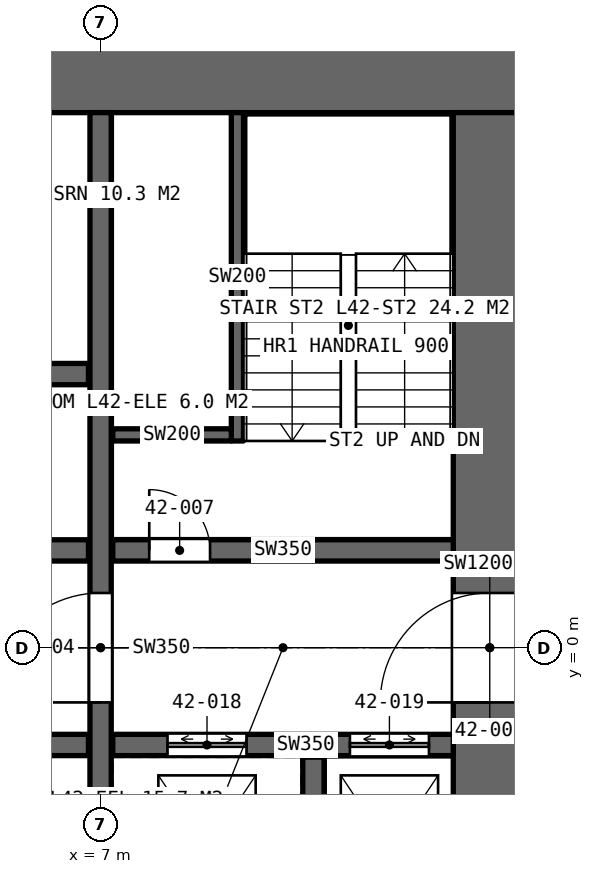
"""IFC4 building model, lengths in metres.
Left out: names, types, materials, properties, quantities, classifications, styles, units other than length and angle.
Written with IfcOpenShell. Run it as: python <this file> out.ifc"""

import sys

from ifc_helpers import new_model, si_unit, direction, frame, frame_2d, origin, place, context, subcontext, project, spatial, rectangle, extrude, element, fill, save


model = new_model("IFC4")
c1 = context("Model", 3, precision=1e-05, world=origin(), true_north=direction((0.0, 1.0)))
c2 = subcontext(c1, "Body", "Model", "MODEL_VIEW")
j1 = project(units=[si_unit("LENGTHUNIT", "METRE"), si_unit("PLANEANGLEUNIT", "RADIAN")], contexts=[c1])
p1 = place(None, origin())
s1 = spatial("IfcSite", under=j1, at=p1, CompositionType="ELEMENT")
p2 = place(p1, origin())
s2 = spatial("IfcBuilding", under=s1, at=p2, CompositionType="ELEMENT")
p3 = place(p2, frame((0.0, 0.0, 194.8)))
s3 = spatial("IfcBuildingStorey", under=s2, at=p3, CompositionType="ELEMENT", Elevation=194.8)
p4 = place(p3, frame((14.0, 9.4, 0.0), z_axis=(0.0, 0.0, 1.0), x_axis=(-1.0, 0.0, 0.0)))
e1 = element("IfcWall", 1, at=p4, inside=s3, PredefinedType="SHEAR", context=c2, shape_type="SweptSolid", body=[
    extrude(rectangle(XDim=28.0, YDim=1.2, at=frame_2d((14.0, 0.0))), origin(), (0.0, 0.0, 1.0), 4.2),
])
p5 = place(p4, frame((24.0, 0.0, 0.0)))
e2 = element("IfcOpeningElement", 2, at=p5, cuts=e1, PredefinedType="OPENING", context=c2, shape_type="SweptSolid", body=[
    extrude(rectangle(XDim=1.0, YDim=2.4, at=frame_2d((0.5, 1.2))), frame((0.0, 0.61, 0.0), z_axis=(0.0, -1.0, 0.0), x_axis=(1.0, 0.0, 0.0)), (0.0, 0.0, 1.0), 1.22),
])
p6 = place(p3, frame((13.4, -8.8, 0.0), z_axis=(0.0, 0.0, 1.0), x_axis=(0.0, 1.0, 0.0)))
e3 = element("IfcWall", 3, at=p6, inside=s3, PredefinedType="SHEAR", context=c2, shape_type="SweptSolid", body=[
    extrude(rectangle(XDim=17.6, YDim=1.2, at=frame_2d((8.8, 0.0))), origin(), (0.0, 0.0, 1.0), 4.2),
])
p7 = place(p6, frame((7.9, 0.0, 0.0)))
e4 = element("IfcOpeningElement", 4, at=p7, cuts=e3, PredefinedType="OPENING", context=c2, shape_type="SweptSolid", body=[
    extrude(rectangle(XDim=1.8, YDim=2.4, at=frame_2d((0.9, 1.2))), frame((0.0, 0.61, 0.0), z_axis=(0.0, -1.0, 0.0), x_axis=(1.0, 0.0, 0.0)), (0.0, 0.0, 1.0), 1.22),
])
p8 = place(p3, frame((7.0, -8.8, 0.0), z_axis=(0.0, 0.0, 1.0), x_axis=(0.0, 1.0, 0.0)))
e5 = element("IfcWall", 5, at=p8, inside=s3, PredefinedType="SHEAR", context=c2, shape_type="SweptSolid", body=[
    extrude(rectangle(XDim=17.6, YDim=0.35, at=frame_2d((8.8, 0.0))), origin(), (0.0, 0.0, 1.0), 4.2),
])
p9 = place(p8, frame((7.9, 0.0, 0.0)))
e6 = element("IfcOpeningElement", 6, at=p9, cuts=e5, PredefinedType="OPENING", context=c2, shape_type="SweptSolid", body=[
    extrude(rectangle(XDim=1.8, YDim=2.4, at=frame_2d((0.9, 1.2))), frame((0.0, 0.185, 0.0), z_axis=(0.0, -1.0, 0.0), x_axis=(1.0, 0.0, 0.0)), (0.0, 0.0, 1.0), 0.37),
])
p10 = place(p3, frame((-6.8, 1.6, 0.0), z_axis=(0.0, 0.0, 1.0), x_axis=(1.0, 0.0, 0.0)))
e7 = element("IfcWall", 7, at=p10, inside=s3, PredefinedType="SHEAR", context=c2, shape_type="SweptSolid", body=[
    extrude(rectangle(XDim=13.6, YDim=0.35, at=frame_2d((6.8, 0.0))), origin(), (0.0, 0.0, 1.0), 4.2),
])
p11 = place(p10, frame((11.9, 0.0, 0.0)))
e8 = element("IfcOpeningElement", 8, at=p11, cuts=e7, PredefinedType="OPENING", context=c2, shape_type="SweptSolid", body=[
    extrude(rectangle(XDim=1.0, YDim=2.4, at=frame_2d((0.5, 1.2))), frame((0.0, 0.185, 0.0), z_axis=(0.0, -1.0, 0.0), x_axis=(1.0, 0.0, 0.0)), (0.0, 0.0, 1.0), 0.37),
])
p12 = place(p10, frame((4.5, 0.0, 0.0)))
e9 = element("IfcOpeningElement", 9, at=p12, cuts=e7, PredefinedType="OPENING", context=c2, shape_type="SweptSolid", body=[
    extrude(rectangle(XDim=1.8, YDim=2.4, at=frame_2d((0.9, 1.2))), frame((0.0, 0.185, 0.0), z_axis=(0.0, -1.0, 0.0), x_axis=(1.0, 0.0, 0.0)), (0.0, 0.0, 1.0), 0.37),
])
p13 = place(p3, frame((-6.8, -1.6, 0.0), z_axis=(0.0, 0.0, 1.0), x_axis=(1.0, 0.0, 0.0)))
e10 = element("IfcWall", 10, at=p13, inside=s3, PredefinedType="SHEAR", context=c2, shape_type="SweptSolid", body=[
    extrude(rectangle(XDim=13.6, YDim=0.35, at=frame_2d((6.8, 0.0))), origin(), (0.0, 0.0, 1.0), 4.2),
])
p14 = place(p13, frame((1.265, 0.0, 0.0)))
e11 = element("IfcOpeningElement", 11, at=p14, cuts=e10, PredefinedType="OPENING", context=c2, shape_type="SweptSolid", body=[
    extrude(rectangle(XDim=1.0, YDim=2.4, at=frame_2d((0.5, 1.2))), frame((0.0, 0.185, 0.0), z_axis=(0.0, -1.0, 0.0), x_axis=(1.0, 0.0, 0.0)), (0.0, 0.0, 1.0), 0.37),
])
p15 = place(p13, frame((4.9, 0.0, 0.0)))
e12 = element("IfcOpeningElement", 12, at=p15, cuts=e10, PredefinedType="OPENING", context=c2, shape_type="SweptSolid", body=[
    extrude(rectangle(XDim=1.0, YDim=2.4, at=frame_2d((0.5, 1.2))), frame((0.0, 0.185, 0.0), z_axis=(0.0, -1.0, 0.0), x_axis=(1.0, 0.0, 0.0)), (0.0, 0.0, 1.0), 0.37),
])
p16 = place(p13, frame((8.485, 0.0, 0.0)))
e13 = element("IfcOpeningElement", 13, at=p16, cuts=e10, PredefinedType="OPENING", context=c2, shape_type="SweptSolid", body=[
    extrude(rectangle(XDim=1.1, YDim=2.4, at=frame_2d((0.55, 1.2))), frame((0.0, 0.185, 0.0), z_axis=(0.0, -1.0, 0.0), x_axis=(1.0, 0.0, 0.0)), (0.0, 0.0, 1.0), 0.37),
])
p17 = place(p13, frame((11.95, 0.0, 0.0)))
e14 = element("IfcOpeningElement", 14, at=p17, cuts=e10, PredefinedType="OPENING", context=c2, shape_type="SweptSolid", body=[
    extrude(rectangle(XDim=0.9, YDim=2.4, at=frame_2d((0.45, 1.2))), frame((0.0, 0.185, 0.0), z_axis=(0.0, -1.0, 0.0), x_axis=(1.0, 0.0, 0.0)), (0.0, 0.0, 1.0), 0.37),
])
p18 = place(p3, frame((-6.8, 4.5, 0.0), z_axis=(0.0, 0.0, 1.0), x_axis=(1.0, 0.0, 0.0)))
e15 = element("IfcWall", 15, at=p18, inside=s3, PredefinedType="SHEAR", context=c2, shape_type="SweptSolid", body=[
    extrude(rectangle(XDim=13.6, YDim=0.35, at=frame_2d((6.8, 0.0))), origin(), (0.0, 0.0, 1.0), 4.2),
])
p19 = place(p18, frame((0.7, 0.0, 0.0)))
e16 = element("IfcOpeningElement", 16, at=p19, cuts=e15, PredefinedType="OPENING", context=c2, shape_type="SweptSolid", body=[
    extrude(rectangle(XDim=1.1, YDim=2.4, at=frame_2d((0.55, 1.2))), frame((0.0, 0.185, 0.0), z_axis=(0.0, -1.0, 0.0), x_axis=(1.0, 0.0, 0.0)), (0.0, 0.0, 1.0), 0.37),
])
p20 = place(p18, frame((3.5, 0.0, 0.0)))
e17 = element("IfcOpeningElement", 17, at=p20, cuts=e15, PredefinedType="OPENING", context=c2, shape_type="SweptSolid", body=[
    extrude(rectangle(XDim=1.1, YDim=2.4, at=frame_2d((0.55, 1.2))), frame((0.0, 0.185, 0.0), z_axis=(0.0, -1.0, 0.0), x_axis=(1.0, 0.0, 0.0)), (0.0, 0.0, 1.0), 0.37),
])
p21 = place(p18, frame((6.3, 0.0, 0.0)))
e18 = element("IfcOpeningElement", 18, at=p21, cuts=e15, PredefinedType="OPENING", context=c2, shape_type="SweptSolid", body=[
    extrude(rectangle(XDim=1.1, YDim=2.4, at=frame_2d((0.55, 1.2))), frame((0.0, 0.185, 0.0), z_axis=(0.0, -1.0, 0.0), x_axis=(1.0, 0.0, 0.0)), (0.0, 0.0, 1.0), 0.37),
])
p22 = place(p18, frame((9.1, 0.0, 0.0)))
e19 = element("IfcOpeningElement", 19, at=p22, cuts=e15, PredefinedType="OPENING", context=c2, shape_type="SweptSolid", body=[
    extrude(rectangle(XDim=1.1, YDim=2.4, at=frame_2d((0.55, 1.2))), frame((0.0, 0.185, 0.0), z_axis=(0.0, -1.0, 0.0), x_axis=(1.0, 0.0, 0.0)), (0.0, 0.0, 1.0), 0.37),
])
p23 = place(p3, frame((7.2, 1.6, 0.0), z_axis=(0.0, 0.0, 1.0), x_axis=(1.0, 0.0, 0.0)))
e20 = element("IfcWall", 20, at=p23, inside=s3, PredefinedType="SHEAR", context=c2, shape_type="SweptSolid", body=[
    extrude(rectangle(XDim=5.6, YDim=0.35, at=frame_2d((2.8, 0.0))), origin(), (0.0, 0.0, 1.0), 4.2),
])
p24 = place(p23, frame((0.6, 0.0, 0.0)))
e21 = element("IfcOpeningElement", 21, at=p24, cuts=e20, PredefinedType="OPENING", context=c2, shape_type="SweptSolid", body=[
    extrude(rectangle(XDim=1.0, YDim=2.4, at=frame_2d((0.5, 1.2))), frame((0.0, 0.185, 0.0), z_axis=(0.0, -1.0, 0.0), x_axis=(1.0, 0.0, 0.0)), (0.0, 0.0, 1.0), 0.37),
])
p25 = place(p3, frame((7.2, -1.6, 0.0), z_axis=(0.0, 0.0, 1.0), x_axis=(1.0, 0.0, 0.0)))
e22 = element("IfcWall", 22, at=p25, inside=s3, PredefinedType="SHEAR", context=c2, shape_type="SweptSolid", body=[
    extrude(rectangle(XDim=5.6, YDim=0.35, at=frame_2d((2.8, 0.0))), origin(), (0.0, 0.0, 1.0), 4.2),
])
p26 = place(p25, frame((0.9, 0.0, 0.0)))
e23 = element("IfcOpeningElement", 23, at=p26, cuts=e22, PredefinedType="OPENING", context=c2, shape_type="SweptSolid", body=[
    extrude(rectangle(XDim=1.3, YDim=2.4, at=frame_2d((0.65, 1.2))), frame((0.0, 0.185, 0.0), z_axis=(0.0, -1.0, 0.0), x_axis=(1.0, 0.0, 0.0)), (0.0, 0.0, 1.0), 0.37),
])
p27 = place(p25, frame((3.9, 0.0, 0.0)))
e24 = element("IfcOpeningElement", 24, at=p27, cuts=e22, PredefinedType="OPENING", context=c2, shape_type="SweptSolid", body=[
    extrude(rectangle(XDim=1.3, YDim=2.4, at=frame_2d((0.65, 1.2))), frame((0.0, 0.185, 0.0), z_axis=(0.0, -1.0, 0.0), x_axis=(1.0, 0.0, 0.0)), (0.0, 0.0, 1.0), 0.37),
])
p28 = place(p3, frame((10.5, -4.8, 0.0), z_axis=(0.0, 0.0, 1.0), x_axis=(0.0, 1.0, 0.0)))
e25 = element("IfcWall", 25, at=p28, inside=s3, PredefinedType="SHEAR", context=c2, shape_type="SweptSolid", body=[
    extrude(rectangle(XDim=3.0, YDim=0.35, at=frame_2d((1.5, 0.0))), origin(), (0.0, 0.0, 1.0), 4.2),
])
p29 = place(p3, frame((9.25, 3.4, 0.0), z_axis=(0.0, 0.0, 1.0), x_axis=(0.0, 1.0, 0.0)))
e26 = element("IfcWall", 26, at=p29, inside=s3, PredefinedType="SOLIDWALL", context=c2, shape_type="SweptSolid", body=[
    extrude(rectangle(XDim=5.4, YDim=0.2, at=frame_2d((2.7, 0.0))), origin(), (0.0, 0.0, 1.0), 4.2),
])
p30 = place(p3, frame((9.15, 3.5, 0.0), z_axis=(0.0, 0.0, 1.0), x_axis=(-1.0, 0.0, 0.0)))
e27 = element("IfcWall", 27, at=p30, inside=s3, PredefinedType="SOLIDWALL", context=c2, shape_type="SweptSolid", body=[
    extrude(rectangle(XDim=1.95, YDim=0.2, at=frame_2d((0.975, 0.0))), origin(), (0.0, 0.0, 1.0), 4.2),
])
p31 = place(p7, origin())
e28 = element("IfcDoor", 28, at=p31, inside=s3, OperationType="DOUBLE_DOOR_SINGLE_SWING", PredefinedType="DOOR", context=c2, shape_type="SweptSolid", body=[
    extrude(rectangle(XDim=1.8, YDim=2.4, at=frame_2d((0.9, 1.2))), frame((0.0, 0.025, 0.0), z_axis=(0.0, -1.0, 0.0), x_axis=(1.0, 0.0, 0.0)), (0.0, 0.0, 1.0), 0.05),
])
fill(e4, e28)
p32 = place(p9, origin())
e29 = element("IfcDoor", 29, at=p32, inside=s3, OperationType="DOUBLE_DOOR_SINGLE_SWING", PredefinedType="DOOR", context=c2, shape_type="SweptSolid", body=[
    extrude(rectangle(XDim=1.8, YDim=2.4, at=frame_2d((0.9, 1.2))), frame((0.0, 0.025, 0.0), z_axis=(0.0, -1.0, 0.0), x_axis=(1.0, 0.0, 0.0)), (0.0, 0.0, 1.0), 0.05),
])
fill(e6, e29)
p33 = place(p24, origin())
e30 = element("IfcDoor", 30, at=p33, inside=s3, OperationType="SINGLE_SWING_LEFT", PredefinedType="DOOR", context=c2, shape_type="SweptSolid", body=[
    extrude(rectangle(XDim=1.0, YDim=2.4, at=frame_2d((0.5, 1.2))), frame((0.0, 0.025, 0.0), z_axis=(0.0, -1.0, 0.0), x_axis=(1.0, 0.0, 0.0)), (0.0, 0.0, 1.0), 0.05),
])
fill(e21, e30)
p34 = place(p26, origin())
e31 = element("IfcDoor", 31, at=p34, inside=s3, OperationType="DOUBLE_DOOR_SLIDING", PredefinedType="DOOR", context=c2, shape_type="SweptSolid", body=[
    extrude(rectangle(XDim=1.3, YDim=2.4, at=frame_2d((0.65, 1.2))), frame((0.0, 0.025, 0.0), z_axis=(0.0, -1.0, 0.0), x_axis=(1.0, 0.0, 0.0)), (0.0, 0.0, 1.0), 0.05),
])
fill(e23, e31)
p35 = place(p27, origin())
e32 = element("IfcDoor", 32, at=p35, inside=s3, OperationType="DOUBLE_DOOR_SLIDING", PredefinedType="DOOR", context=c2, shape_type="SweptSolid", body=[
    extrude(rectangle(XDim=1.3, YDim=2.4, at=frame_2d((0.65, 1.2))), frame((0.0, 0.025, 0.0), z_axis=(0.0, -1.0, 0.0), x_axis=(1.0, 0.0, 0.0)), (0.0, 0.0, 1.0), 0.05),
])
fill(e24, e32)
save(model, sys.argv[1])
